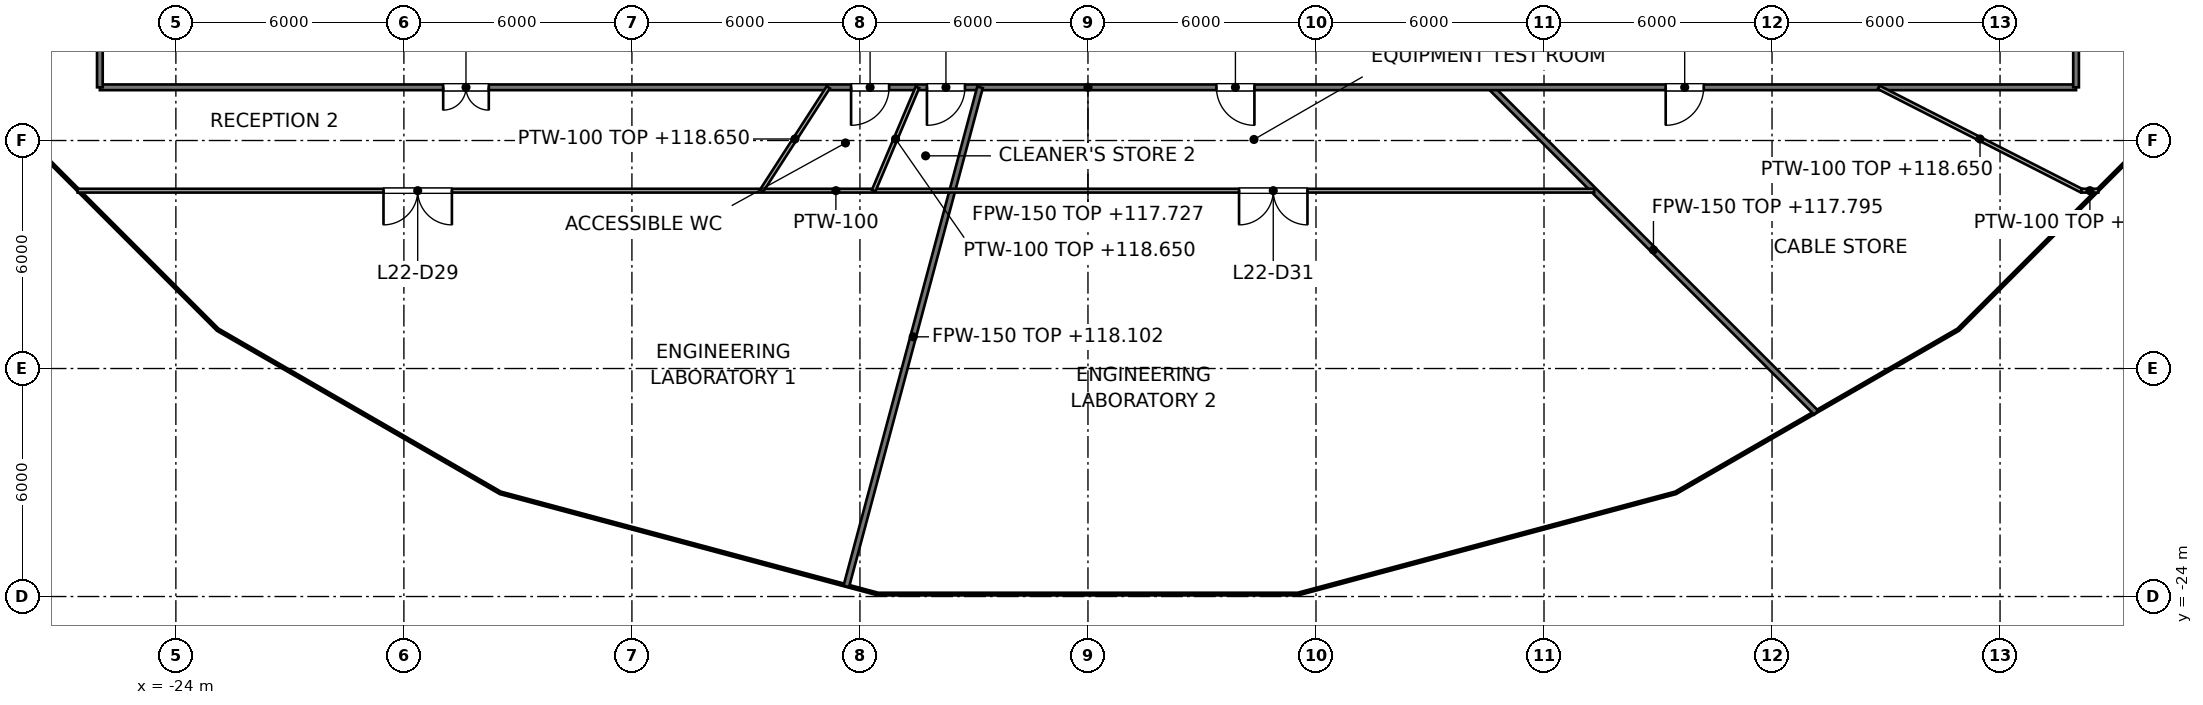
"""IFC4 building model, lengths in metres.
Left out: names, types, materials, properties, quantities, classifications, styles, units other than length and angle.
Written with IfcOpenShell. Run it as: python <this file> out.ifc"""

import sys

from ifc_helpers import new_model, si_unit, direction, frame, frame_2d, origin, place, context, subcontext, project, spatial, rectangle, extrude, element, fill, save


model = new_model("IFC4")
c1 = context("Model", 3, precision=1e-05, world=origin(), true_north=direction((0.0, 1.0)))
c2 = subcontext(c1, "Body", "Model", "MODEL_VIEW")
j1 = project(units=[si_unit("LENGTHUNIT", "METRE"), si_unit("PLANEANGLEUNIT", "RADIAN")], contexts=[c1])
p1 = place(None, origin())
s1 = spatial("IfcSite", under=j1, at=p1, CompositionType="ELEMENT")
p2 = place(p1, origin())
s2 = spatial("IfcBuilding", under=s1, at=p2, CompositionType="ELEMENT")
p3 = place(p2, frame((0.0, 0.0, 114.6)))
s3 = spatial("IfcBuildingStorey", under=s2, at=p3, CompositionType="ELEMENT", Elevation=114.6)
p4 = place(p3, frame((10.6, -10.6, 0.0), z_axis=(0.0, 0.0, 1.0), x_axis=(0.707106781187, -0.707106781187, 0.0)))
e1 = element("IfcWall", 1, at=p4, inside=s3, PredefinedType="PARTITIONING", context=c2, shape_type="SweptSolid", body=[
    extrude(rectangle(XDim=12.105, YDim=0.15, at=frame_2d((6.053, 0.0))), origin(), (0.0, 0.0, 1.0), 3.195),
])
p5 = place(p3, frame((-26.0, -10.6, 0.0), z_axis=(0.0, 0.0, 1.0), x_axis=(1.0, 0.0, 0.0)))
e2 = element("IfcWall", 2, at=p5, inside=s3, PredefinedType="PARTITIONING", context=c2, shape_type="SweptSolid", body=[
    extrude(rectangle(XDim=52.0, YDim=0.15, at=frame_2d((26.0, 0.0))), origin(), (0.0, 0.0, 1.0), 3.127),
])
p6 = place(p5, frame((9.034, 0.0, 0.0)))
e3 = element("IfcOpeningElement", 3, at=p6, cuts=e2, PredefinedType="OPENING", context=c2, shape_type="SweptSolid", body=[
    extrude(rectangle(XDim=1.2, YDim=2.1, at=frame_2d((0.6, 1.05))), frame((0.0, 0.075, 0.0), z_axis=(0.0, -1.0, 0.0), x_axis=(1.0, 0.0, 0.0)), (0.0, 0.0, 1.0), 0.15),
])
p7 = place(p5, frame((19.767, 0.0, 0.0)))
e4 = element("IfcOpeningElement", 4, at=p7, cuts=e2, PredefinedType="OPENING", context=c2, shape_type="SweptSolid", body=[
    extrude(rectangle(XDim=1.0, YDim=2.1, at=frame_2d((0.5, 1.05))), frame((0.0, 0.075, 0.0), z_axis=(0.0, -1.0, 0.0), x_axis=(1.0, 0.0, 0.0)), (0.0, 0.0, 1.0), 0.15),
])
p8 = place(p5, frame((21.763, 0.0, 0.0)))
e5 = element("IfcOpeningElement", 5, at=p8, cuts=e2, PredefinedType="OPENING", context=c2, shape_type="SweptSolid", body=[
    extrude(rectangle(XDim=1.0, YDim=2.1, at=frame_2d((0.5, 1.05))), frame((0.0, 0.075, 0.0), z_axis=(0.0, -1.0, 0.0), x_axis=(1.0, 0.0, 0.0)), (0.0, 0.0, 1.0), 0.15),
])
p9 = place(p5, frame((29.38, 0.0, 0.0)))
e6 = element("IfcOpeningElement", 6, at=p9, cuts=e2, PredefinedType="OPENING", context=c2, shape_type="SweptSolid", body=[
    extrude(rectangle(XDim=1.0, YDim=2.1, at=frame_2d((0.5, 1.05))), frame((0.0, 0.075, 0.0), z_axis=(0.0, -1.0, 0.0), x_axis=(1.0, 0.0, 0.0)), (0.0, 0.0, 1.0), 0.15),
])
p10 = place(p5, frame((41.202, 0.0, 0.0)))
e7 = element("IfcOpeningElement", 7, at=p10, cuts=e2, PredefinedType="OPENING", context=c2, shape_type="SweptSolid", body=[
    extrude(rectangle(XDim=1.0, YDim=2.1, at=frame_2d((0.5, 1.05))), frame((0.0, 0.075, 0.0), z_axis=(0.0, -1.0, 0.0), x_axis=(1.0, 0.0, 0.0)), (0.0, 0.0, 1.0), 0.15),
])
p11 = place(p3, frame((-6.359, -23.732, 0.0), z_axis=(0.0, 0.0, 1.0), x_axis=(0.258844995685, 0.965918872478, 0.0)))
e8 = element("IfcWall", 8, at=p11, inside=s3, PredefinedType="PARTITIONING", context=c2, shape_type="SweptSolid", body=[
    extrude(rectangle(XDim=13.595, YDim=0.15, at=frame_2d((6.798, 0.0))), origin(), (0.0, 0.0, 1.0), 3.502),
])
for number, where, z_axis, x_axis in (
    (9, (26.0, -10.6, 0.0), (0.0, 0.0, 1.0), (0.0, 1.0, 0.0)),
    (10, (-26.0, -10.6, 0.0), (0.0, 0.0, 1.0), (0.0, 1.0, 0.0)),
):
    element("IfcWall", number, at=place(p3, frame(where, z_axis=z_axis, x_axis=x_axis)), inside=s3, PredefinedType="PARTITIONING", context=c2, shape_type="SweptSolid", body=[
        extrude(rectangle(XDim=2.8, YDim=0.15, at=frame_2d((1.4, 0.0))), origin(), (0.0, 0.0, 1.0), 3.276),
    ])
p12 = place(p3, frame((20.804, -10.6, 0.0), z_axis=(0.0, 0.0, 1.0), x_axis=(0.891002798049, -0.453997812626, 0.0)))
e11 = element("IfcWall", 11, at=p12, inside=s3, PredefinedType="PARTITIONING", context=c2, shape_type="SweptSolid", body=[
    extrude(rectangle(XDim=5.991, YDim=0.1, at=frame_2d((2.996, 0.0))), origin(), (0.0, 0.0, 1.0), 4.05),
])
p13 = place(p3, frame((-26.586, -13.32, 0.0), z_axis=(0.0, 0.0, 1.0), x_axis=(1.0, 0.0, 0.0)))
e12 = element("IfcWall", 12, at=p13, inside=s3, PredefinedType="PARTITIONING", context=c2, shape_type="SweptSolid", body=[
    extrude(rectangle(XDim=39.906, YDim=0.1, at=frame_2d((19.953, 0.0))), origin(), (0.0, 0.0, 1.0), 3.127),
])
p14 = place(p13, frame((8.049, 0.0, 0.0)))
e13 = element("IfcOpeningElement", 13, at=p14, cuts=e12, PredefinedType="OPENING", context=c2, shape_type="SweptSolid", body=[
    extrude(rectangle(XDim=1.8, YDim=2.1, at=frame_2d((0.9, 1.05))), frame((0.0, 0.05, 0.0), z_axis=(0.0, -1.0, 0.0), x_axis=(1.0, 0.0, 0.0)), (0.0, 0.0, 1.0), 0.1),
])
p15 = place(p13, frame((30.562, 0.0, 0.0)))
e14 = element("IfcOpeningElement", 14, at=p15, cuts=e12, PredefinedType="OPENING", context=c2, shape_type="SweptSolid", body=[
    extrude(rectangle(XDim=1.8, YDim=2.1, at=frame_2d((0.9, 1.05))), frame((0.0, 0.05, 0.0), z_axis=(0.0, -1.0, 0.0), x_axis=(1.0, 0.0, 0.0)), (0.0, 0.0, 1.0), 0.1),
])
p16 = place(p3, frame((26.142, -13.32, 0.0), z_axis=(0.0, 0.0, 1.0), x_axis=(1.0, 0.0, 0.0)))
e15 = element("IfcWall", 15, at=p16, inside=s3, PredefinedType="PARTITIONING", context=c2, shape_type="SweptSolid", body=[
    extrude(rectangle(XDim=0.444, YDim=0.1, at=frame_2d((0.222, 0.0))), origin(), (0.0, 0.0, 1.0), 3.675),
])
p17 = place(p3, frame((-8.587, -13.32, 0.0), z_axis=(0.0, 0.0, 1.0), x_axis=(0.54192754119, 0.840425213865, 0.0)))
e16 = element("IfcWall", 16, at=p17, inside=s3, PredefinedType="PARTITIONING", context=c2, shape_type="SweptSolid", body=[
    extrude(rectangle(XDim=3.236, YDim=0.1, at=frame_2d((1.618, 0.0))), origin(), (0.0, 0.0, 1.0), 4.05),
])
p18 = place(p3, frame((-5.639, -13.32, 0.0), z_axis=(0.0, 0.0, 1.0), x_axis=(0.389955437881, 0.920833729002, 0.0)))
e17 = element("IfcWall", 17, at=p18, inside=s3, PredefinedType="PARTITIONING", context=c2, shape_type="SweptSolid", body=[
    extrude(rectangle(XDim=2.954, YDim=0.1, at=frame_2d((1.477, 0.0))), origin(), (0.0, 0.0, 1.0), 4.05),
])
p19 = place(p6, origin())
e18 = element("IfcDoor", 18, at=p19, inside=s3, OperationType="DOUBLE_DOOR_SINGLE_SWING", PredefinedType="DOOR", context=c2, shape_type="SweptSolid", body=[
    extrude(rectangle(XDim=1.2, YDim=2.1, at=frame_2d((0.6, 1.05))), frame((0.0, 0.025, 0.0), z_axis=(0.0, -1.0, 0.0), x_axis=(1.0, 0.0, 0.0)), (0.0, 0.0, 1.0), 0.05),
])
fill(e3, e18)
p20 = place(p7, origin())
e19 = element("IfcDoor", 19, at=p20, inside=s3, OperationType="SINGLE_SWING_LEFT", PredefinedType="DOOR", context=c2, shape_type="SweptSolid", body=[
    extrude(rectangle(XDim=1.0, YDim=2.1, at=frame_2d((0.5, 1.05))), frame((0.0, 0.025, 0.0), z_axis=(0.0, -1.0, 0.0), x_axis=(1.0, 0.0, 0.0)), (0.0, 0.0, 1.0), 0.05),
])
fill(e4, e19)
p21 = place(p8, origin())
e20 = element("IfcDoor", 20, at=p21, inside=s3, OperationType="SINGLE_SWING_LEFT", PredefinedType="DOOR", context=c2, shape_type="SweptSolid", body=[
    extrude(rectangle(XDim=1.0, YDim=2.1, at=frame_2d((0.5, 1.05))), frame((0.0, 0.025, 0.0), z_axis=(0.0, -1.0, 0.0), x_axis=(1.0, 0.0, 0.0)), (0.0, 0.0, 1.0), 0.05),
])
fill(e5, e20)
p22 = place(p14, origin())
e21 = element("IfcDoor", 21, at=p22, inside=s3, OperationType="DOUBLE_DOOR_SINGLE_SWING", PredefinedType="DOOR", context=c2, shape_type="SweptSolid", body=[
    extrude(rectangle(XDim=1.8, YDim=2.1, at=frame_2d((0.9, 1.05))), frame((0.0, 0.025, 0.0), z_axis=(0.0, -1.0, 0.0), x_axis=(1.0, 0.0, 0.0)), (0.0, 0.0, 1.0), 0.05),
])
fill(e13, e21)
p23 = place(p9, origin())
e22 = element("IfcDoor", 22, at=p23, inside=s3, OperationType="SINGLE_SWING_RIGHT", PredefinedType="DOOR", context=c2, shape_type="SweptSolid", body=[
    extrude(rectangle(XDim=1.0, YDim=2.1, at=frame_2d((0.5, 1.05))), frame((0.0, 0.025, 0.0), z_axis=(0.0, -1.0, 0.0), x_axis=(1.0, 0.0, 0.0)), (0.0, 0.0, 1.0), 0.05),
])
fill(e6, e22)
p24 = place(p15, origin())
e23 = element("IfcDoor", 23, at=p24, inside=s3, OperationType="DOUBLE_DOOR_SINGLE_SWING", PredefinedType="DOOR", context=c2, shape_type="SweptSolid", body=[
    extrude(rectangle(XDim=1.8, YDim=2.1, at=frame_2d((0.9, 1.05))), frame((0.0, 0.025, 0.0), z_axis=(0.0, -1.0, 0.0), x_axis=(1.0, 0.0, 0.0)), (0.0, 0.0, 1.0), 0.05),
])
fill(e14, e23)
p25 = place(p10, origin())
e24 = element("IfcDoor", 24, at=p25, inside=s3, OperationType="SINGLE_SWING_LEFT", PredefinedType="DOOR", context=c2, shape_type="SweptSolid", body=[
    extrude(rectangle(XDim=1.0, YDim=2.1, at=frame_2d((0.5, 1.05))), frame((0.0, 0.025, 0.0), z_axis=(0.0, -1.0, 0.0), x_axis=(1.0, 0.0, 0.0)), (0.0, 0.0, 1.0), 0.05),
])
fill(e7, e24)
save(model, sys.argv[1])
